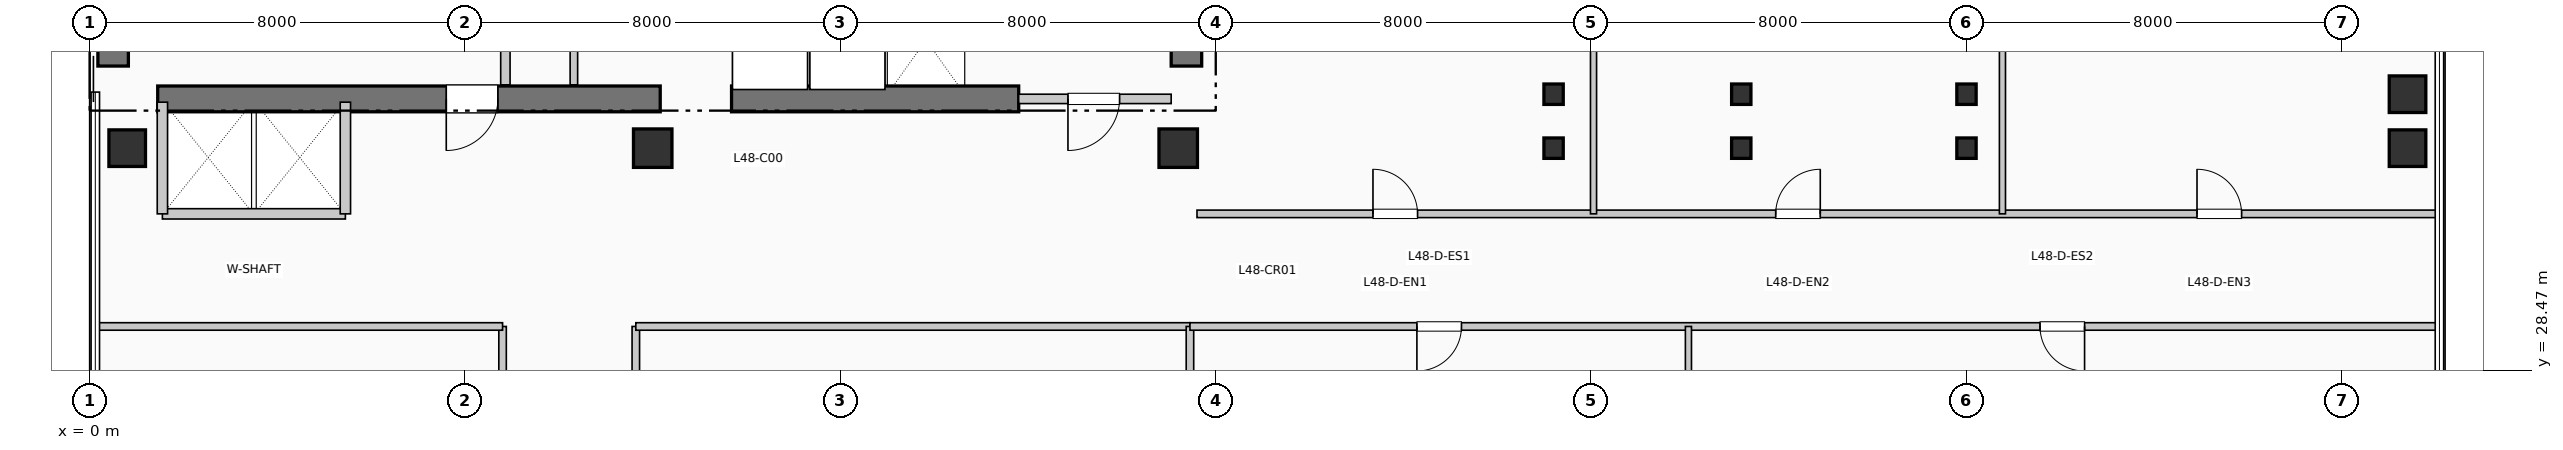
"""IFC4 building model, lengths in metres.
Left out: names, types, materials, properties, quantities, classifications, styles, units other than length and angle.
Written with IfcOpenShell. Run it as: python <this file> out.ifc"""

import sys

from ifc_helpers import new_model, si_unit, direction, frame, frame_2d, origin, origin_2d, place, context, subcontext, project, spatial, rectangle, i_section, extrude, element, fill, save


model = new_model("IFC4")
c1 = context("Model", 3, precision=1e-05, world=origin(), true_north=direction((0.0, 1.0)))
c2 = subcontext(c1, "Body", "Model", "MODEL_VIEW")
j1 = project(units=[si_unit("LENGTHUNIT", "METRE"), si_unit("PLANEANGLEUNIT", "RADIAN")], contexts=[c1])
p1 = place(None, origin())
s1 = spatial("IfcSite", under=j1, at=p1, CompositionType="ELEMENT")
p2 = place(p1, origin())
s2 = spatial("IfcBuilding", under=s1, at=p2, CompositionType="ELEMENT")
p3 = place(p2, frame((0.0, 0.0, 199.32)))
s3 = spatial("IfcBuildingStorey", under=s2, at=p3, CompositionType="ELEMENT", Elevation=199.32)
p4 = place(p3, frame((0.5, 34.95, 0.0), z_axis=(0.0, 0.0, 1.0), x_axis=(0.0, 1.0, 0.0)))
e1 = element("IfcWall", 1, at=p4, inside=s3, PredefinedType="SHEAR", context=c2, shape_type="SweptSolid", body=[
    extrude(rectangle(XDim=7.9, YDim=0.65, at=frame_2d((3.95, 0.0))), origin(), (0.0, 0.0, 1.0), 3.96),
])
p5 = place(p3, frame((23.375, 34.95, 0.0), z_axis=(0.0, 0.0, 1.0), x_axis=(0.0, 1.0, 0.0)))
e2 = element("IfcWall", 2, at=p5, inside=s3, PredefinedType="SHEAR", context=c2, shape_type="SweptSolid", body=[
    extrude(rectangle(XDim=10.64, YDim=0.65, at=frame_2d((5.32, 0.0))), origin(), (0.0, 0.0, 1.0), 3.96),
])
p6 = place(p3, frame((1.45, 34.25, 0.0), z_axis=(0.0, 0.0, 1.0), x_axis=(1.0, 0.0, 0.0)))
e3 = element("IfcWall", 3, at=p6, inside=s3, PredefinedType="SHEAR", context=c2, shape_type="SweptSolid", body=[
    extrude(rectangle(XDim=10.71, YDim=0.55, at=frame_2d((5.355, 0.0))), origin(), (0.0, 0.0, 1.0), 3.96),
])
p7 = place(p6, frame((7.25, 0.0, 0.0), z_axis=(0.0, 0.0, 1.0), x_axis=(-1.0, 0.0, 0.0)))
e4 = element("IfcOpeningElement", 4, at=p7, cuts=e3, PredefinedType="OPENING", context=c2, shape_type="SweptSolid", body=[
    extrude(rectangle(XDim=1.1, YDim=2.15, at=frame_2d((0.55, 1.075))), frame((0.0, 0.285, 0.0), z_axis=(0.0, -1.0, 0.0), x_axis=(1.0, 0.0, 0.0)), (0.0, 0.0, 1.0), 0.57),
])
p8 = place(p3, frame((13.68, 34.25, 0.0), z_axis=(0.0, 0.0, 1.0), x_axis=(1.0, 0.0, 0.0)))
e5 = element("IfcWall", 5, at=p8, inside=s3, PredefinedType="SHEAR", context=c2, shape_type="SweptSolid", body=[
    extrude(rectangle(XDim=6.12, YDim=0.55, at=frame_2d((3.06, 0.0))), origin(), (0.0, 0.0, 1.0), 3.96),
])
p9 = place(p3, frame((0.8, 33.2, 0.0), z_axis=(0.0, 0.0, 1.0), x_axis=(1.0, 0.0, 0.0)))
e6 = element("IfcColumn", 6, at=p9, inside=s3, PredefinedType="COLUMN", context=c2, shape_type="SweptSolid", body=[
    extrude(rectangle(XDim=0.78, YDim=0.78, at=origin_2d()), origin(), (0.0, 0.0, 1.0), 3.96),
])
for number, where, z_axis, x_axis in (
    (7, (12.0, 33.2, 0.0), (0.0, 0.0, 1.0), (1.0, 0.0, 0.0)),
    (8, (23.2, 33.2, 0.0), (0.0, 0.0, 1.0), (1.0, 0.0, 0.0)),
):
    element("IfcColumn", number, at=place(p3, frame(where, z_axis=z_axis, x_axis=x_axis)), inside=s3, PredefinedType="COLUMN", context=c2, shape_type="SweptSolid", body=[
        extrude(rectangle(XDim=0.82, YDim=0.82, at=origin_2d()), origin(), (0.0, 0.0, 1.0), 3.96),
    ])
for number, where, z_axis, x_axis in (
    (9, (31.2, 33.2, 0.0), (0.0, 0.0, 1.0), (1.0, 0.0, 0.0)),
    (10, (31.2, 34.35, 0.0), (0.0, 0.0, 1.0), (1.0, 0.0, 0.0)),
    (11, (35.2, 33.2, 0.0), (0.0, 0.0, 1.0), (1.0, 0.0, 0.0)),
    (12, (35.2, 34.35, 0.0), (0.0, 0.0, 1.0), (1.0, 0.0, 0.0)),
    (13, (40.0, 33.2, 0.0), (0.0, 0.0, 1.0), (1.0, 0.0, 0.0)),
    (14, (40.0, 34.35, 0.0), (0.0, 0.0, 1.0), (1.0, 0.0, 0.0)),
):
    element("IfcColumn", number, at=place(p3, frame(where, z_axis=z_axis, x_axis=x_axis)), inside=s3, PredefinedType="COLUMN", context=c2, shape_type="SweptSolid", body=[
        extrude(i_section(OverallWidth=0.412, OverallDepth=0.435, WebThickness=0.027, FlangeThickness=0.043, at=origin_2d()), origin(), (0.0, 0.0, 1.0), 3.96),
    ])
for number, where, z_axis, x_axis in (
    (15, (49.4, 33.2, 0.0), (0.0, 0.0, 1.0), (1.0, 0.0, 0.0)),
    (16, (49.4, 34.35, 0.0), (0.0, 0.0, 1.0), (1.0, 0.0, 0.0)),
):
    element("IfcColumn", number, at=place(p3, frame(where, z_axis=z_axis, x_axis=x_axis)), inside=s3, PredefinedType="COLUMN", context=c2, shape_type="SweptSolid", body=[
        extrude(rectangle(XDim=0.78, YDim=0.78, at=origin_2d()), origin(), (0.0, 0.0, 1.0), 3.96),
    ])
p10 = place(p3, frame((8.86, 34.55, 0.0), z_axis=(0.0, 0.0, 1.0), x_axis=(0.0, 1.0, 0.0)))
e17 = element("IfcWall", 17, at=p10, inside=s3, PredefinedType="PARTITIONING", context=c2, shape_type="SweptSolid", body=[
    extrude(rectangle(XDim=2.5, YDim=0.2, at=frame_2d((1.25, 0.0))), origin(), (0.0, 0.0, 1.0), 3.71),
])
p11 = place(p3, frame((19.8, 34.25, 0.0), z_axis=(0.0, 0.0, 1.0), x_axis=(1.0, 0.0, 0.0)))
e18 = element("IfcWall", 18, at=p11, inside=s3, PredefinedType="PARTITIONING", context=c2, shape_type="SweptSolid", body=[
    extrude(rectangle(XDim=3.25, YDim=0.2, at=frame_2d((1.625, 0.0))), origin(), (0.0, 0.0, 1.0), 3.71),
])
p12 = place(p11, frame((2.15, 0.0, 0.0), z_axis=(0.0, 0.0, 1.0), x_axis=(-1.0, 0.0, 0.0)))
e19 = element("IfcOpeningElement", 19, at=p12, cuts=e18, PredefinedType="OPENING", context=c2, shape_type="SweptSolid", body=[
    extrude(rectangle(XDim=1.1, YDim=2.15, at=frame_2d((0.55, 1.075))), frame((0.0, 0.11, 0.0), z_axis=(0.0, -1.0, 0.0), x_axis=(1.0, 0.0, 0.0)), (0.0, 0.0, 1.0), 0.22),
])
p13 = place(p3, frame((1.55, 31.8, 0.0), z_axis=(0.0, 0.0, 1.0), x_axis=(1.0, 0.0, 0.0)))
e20 = element("IfcWall", 20, at=p13, inside=s3, PredefinedType="PARTITIONING", context=c2, shape_type="SweptSolid", body=[
    extrude(rectangle(XDim=3.9, YDim=0.22, at=frame_2d((1.95, 0.0))), origin(), (0.0, 0.0, 1.0), 3.71),
])
for number, where, z_axis, x_axis in (
    (21, (1.55, 31.8, 0.0), (0.0, 0.0, 1.0), (0.0, 1.0, 0.0)),
    (22, (5.45, 31.8, 0.0), (0.0, 0.0, 1.0), (0.0, 1.0, 0.0)),
):
    element("IfcWall", number, at=place(p3, frame(where, z_axis=z_axis, x_axis=x_axis)), inside=s3, PredefinedType="PARTITIONING", context=c2, shape_type="SweptSolid", body=[
        extrude(rectangle(XDim=2.38, YDim=0.22, at=frame_2d((1.19, 0.0))), origin(), (0.0, 0.0, 1.0), 3.71),
    ])
p14 = place(p3, frame((10.32, 34.55, 0.0), z_axis=(0.0, 0.0, 1.0), x_axis=(0.0, 1.0, 0.0)))
e23 = element("IfcWall", 23, at=p14, inside=s3, PredefinedType="PARTITIONING", context=c2, shape_type="SweptSolid", body=[
    extrude(rectangle(XDim=2.15, YDim=0.16, at=frame_2d((1.075, 0.0))), origin(), (0.0, 0.0, 1.0), 3.71),
])
p15 = place(p3, frame((8.8, 13.2, 0.0), z_axis=(0.0, 0.0, 1.0), x_axis=(0.0, 1.0, 0.0)))
e24 = element("IfcWall", 24, at=p15, inside=s3, PredefinedType="PARTITIONING", context=c2, shape_type="SweptSolid", body=[
    extrude(rectangle(XDim=16.2, YDim=0.16, at=frame_2d((8.1, 0.0))), origin(), (0.0, 0.0, 1.0), 3.71),
])
p16 = place(p15, frame((2.581, 0.0, 0.0), z_axis=(0.0, 0.0, 1.0), x_axis=(-1.0, 0.0, 0.0)))
e25 = element("IfcOpeningElement", 25, at=p16, cuts=e24, PredefinedType="OPENING", context=c2, shape_type="SweptSolid", body=[
    extrude(rectangle(XDim=0.95, YDim=2.15, at=frame_2d((0.475, 1.075))), frame((0.0, 0.09, 0.0), z_axis=(0.0, -1.0, 0.0), x_axis=(1.0, 0.0, 0.0)), (0.0, 0.0, 1.0), 0.18),
])
p17 = place(p15, frame((7.117, 0.0, 0.0), z_axis=(0.0, 0.0, 1.0), x_axis=(-1.0, 0.0, 0.0)))
e26 = element("IfcOpeningElement", 26, at=p17, cuts=e24, PredefinedType="OPENING", context=c2, shape_type="SweptSolid", body=[
    extrude(rectangle(XDim=0.95, YDim=2.15, at=frame_2d((0.475, 1.075))), frame((0.0, 0.09, 0.0), z_axis=(0.0, -1.0, 0.0), x_axis=(1.0, 0.0, 0.0)), (0.0, 0.0, 1.0), 0.18),
])
p18 = place(p15, frame((13.111, 0.0, 0.0), z_axis=(0.0, 0.0, 1.0), x_axis=(-1.0, 0.0, 0.0)))
e27 = element("IfcOpeningElement", 27, at=p18, cuts=e24, PredefinedType="OPENING", context=c2, shape_type="SweptSolid", body=[
    extrude(rectangle(XDim=0.95, YDim=2.15, at=frame_2d((0.475, 1.075))), frame((0.0, 0.09, 0.0), z_axis=(0.0, -1.0, 0.0), x_axis=(1.0, 0.0, 0.0)), (0.0, 0.0, 1.0), 0.18),
])
p19 = place(p3, frame((11.64, 13.2, 0.0), z_axis=(0.0, 0.0, 1.0), x_axis=(0.0, 1.0, 0.0)))
e28 = element("IfcWall", 28, at=p19, inside=s3, PredefinedType="PARTITIONING", context=c2, shape_type="SweptSolid", body=[
    extrude(rectangle(XDim=16.2, YDim=0.16, at=frame_2d((8.1, 0.0))), origin(), (0.0, 0.0, 1.0), 3.095),
])
p20 = place(p19, frame((3.427, 0.0, 0.0)))
e29 = element("IfcOpeningElement", 29, at=p20, cuts=e28, PredefinedType="OPENING", context=c2, shape_type="SweptSolid", body=[
    extrude(rectangle(XDim=0.95, YDim=2.15, at=frame_2d((0.475, 1.075))), frame((0.0, 0.09, 0.0), z_axis=(0.0, -1.0, 0.0), x_axis=(1.0, 0.0, 0.0)), (0.0, 0.0, 1.0), 0.18),
])
p21 = place(p19, frame((11.027, 0.0, 0.0)))
e30 = element("IfcOpeningElement", 30, at=p21, cuts=e28, PredefinedType="OPENING", context=c2, shape_type="SweptSolid", body=[
    extrude(rectangle(XDim=0.95, YDim=2.15, at=frame_2d((0.475, 1.075))), frame((0.0, 0.09, 0.0), z_axis=(0.0, -1.0, 0.0), x_axis=(1.0, 0.0, 0.0)), (0.0, 0.0, 1.0), 0.18),
])
p22 = place(p3, frame((0.19, 29.4, 0.0), z_axis=(0.0, 0.0, 1.0), x_axis=(1.0, 0.0, 0.0)))
e31 = element("IfcWall", 31, at=p22, inside=s3, PredefinedType="PARTITIONING", context=c2, shape_type="SweptSolid", body=[
    extrude(rectangle(XDim=8.61, YDim=0.16, at=frame_2d((4.305, 0.0))), origin(), (0.0, 0.0, 1.0), 3.365),
])
p23 = place(p3, frame((11.64, 29.4, 0.0), z_axis=(0.0, 0.0, 1.0), x_axis=(1.0, 0.0, 0.0)))
e32 = element("IfcWall", 32, at=p23, inside=s3, PredefinedType="PARTITIONING", context=c2, shape_type="SweptSolid", body=[
    extrude(rectangle(XDim=11.81, YDim=0.16, at=frame_2d((5.905, 0.0))), origin(), (0.0, 0.0, 1.0), 3.365),
])
p24 = place(p3, frame((23.45, 6.84, 0.0), z_axis=(0.0, 0.0, 1.0), x_axis=(0.0, 1.0, 0.0)))
e33 = element("IfcWall", 33, at=p24, inside=s3, PredefinedType="PARTITIONING", context=c2, shape_type="SweptSolid", body=[
    extrude(rectangle(XDim=22.56, YDim=0.16, at=frame_2d((11.28, 0.0))), origin(), (0.0, 0.0, 1.0), 3.095),
])
p25 = place(p3, frame((23.45, 29.4, 0.0), z_axis=(0.0, 0.0, 1.0), x_axis=(1.0, 0.0, 0.0)))
e34 = element("IfcWall", 34, at=p25, inside=s3, PredefinedType="PARTITIONING", context=c2, shape_type="SweptSolid", body=[
    extrude(rectangle(XDim=26.56, YDim=0.16, at=frame_2d((13.28, 0.0))), origin(), (0.0, 0.0, 1.0), 3.365),
])
p26 = place(p25, frame((5.787, 0.0, 0.0), z_axis=(0.0, 0.0, 1.0), x_axis=(-1.0, 0.0, 0.0)))
e35 = element("IfcOpeningElement", 35, at=p26, cuts=e34, PredefinedType="OPENING", context=c2, shape_type="SweptSolid", body=[
    extrude(rectangle(XDim=0.95, YDim=2.15, at=frame_2d((0.475, 1.075))), frame((0.0, 0.09, 0.0), z_axis=(0.0, -1.0, 0.0), x_axis=(1.0, 0.0, 0.0)), (0.0, 0.0, 1.0), 0.18),
])
p27 = place(p25, frame((19.067, 0.0, 0.0), z_axis=(0.0, 0.0, 1.0), x_axis=(-1.0, 0.0, 0.0)))
e36 = element("IfcOpeningElement", 36, at=p27, cuts=e34, PredefinedType="OPENING", context=c2, shape_type="SweptSolid", body=[
    extrude(rectangle(XDim=0.95, YDim=2.15, at=frame_2d((0.475, 1.075))), frame((0.0, 0.09, 0.0), z_axis=(0.0, -1.0, 0.0), x_axis=(1.0, 0.0, 0.0)), (0.0, 0.0, 1.0), 0.18),
])
p28 = place(p3, frame((23.6, 31.8, 0.0), z_axis=(0.0, 0.0, 1.0), x_axis=(1.0, 0.0, 0.0)))
e37 = element("IfcWall", 37, at=p28, inside=s3, PredefinedType="PARTITIONING", context=c2, shape_type="SweptSolid", body=[
    extrude(rectangle(XDim=26.41, YDim=0.16, at=frame_2d((13.205, 0.0))), origin(), (0.0, 0.0, 1.0), 3.71),
])
p29 = place(p28, frame((3.75, 0.0, 0.0)))
e38 = element("IfcOpeningElement", 38, at=p29, cuts=e37, PredefinedType="OPENING", context=c2, shape_type="SweptSolid", body=[
    extrude(rectangle(XDim=0.95, YDim=2.15, at=frame_2d((0.475, 1.075))), frame((0.0, 0.09, 0.0), z_axis=(0.0, -1.0, 0.0), x_axis=(1.0, 0.0, 0.0)), (0.0, 0.0, 1.0), 0.18),
])
p30 = place(p28, frame((12.334, 0.0, 0.0)))
e39 = element("IfcOpeningElement", 39, at=p30, cuts=e37, PredefinedType="OPENING", context=c2, shape_type="SweptSolid", body=[
    extrude(rectangle(XDim=0.95, YDim=2.15, at=frame_2d((0.475, 1.075))), frame((0.0, 0.09, 0.0), z_axis=(0.0, -1.0, 0.0), x_axis=(1.0, 0.0, 0.0)), (0.0, 0.0, 1.0), 0.18),
])
p31 = place(p28, frame((21.313, 0.0, 0.0)))
e40 = element("IfcOpeningElement", 40, at=p31, cuts=e37, PredefinedType="OPENING", context=c2, shape_type="SweptSolid", body=[
    extrude(rectangle(XDim=0.95, YDim=2.15, at=frame_2d((0.475, 1.075))), frame((0.0, 0.09, 0.0), z_axis=(0.0, -1.0, 0.0), x_axis=(1.0, 0.0, 0.0)), (0.0, 0.0, 1.0), 0.18),
])
p32 = place(p3, frame((34.074, 22.19, 0.0), z_axis=(0.0, 0.0, 1.0), x_axis=(0.0, 1.0, 0.0)))
e41 = element("IfcWall", 41, at=p32, inside=s3, PredefinedType="PARTITIONING", context=c2, shape_type="SweptSolid", body=[
    extrude(rectangle(XDim=7.21, YDim=0.13, at=frame_2d((3.605, 0.0))), origin(), (0.0, 0.0, 1.0), 3.71),
])
for number, where, z_axis, x_axis in (
    (42, (32.051, 31.8, 0.0), (0.0, 0.0, 1.0), (0.0, 1.0, 0.0)),
    (43, (40.767, 31.8, 0.0), (0.0, 0.0, 1.0), (0.0, 1.0, 0.0)),
):
    element("IfcWall", number, at=place(p3, frame(where, z_axis=z_axis, x_axis=x_axis)), inside=s3, PredefinedType="PARTITIONING", context=c2, shape_type="SweptSolid", body=[
        extrude(rectangle(XDim=14.01, YDim=0.13, at=frame_2d((7.005, 0.0))), origin(), (0.0, 0.0, 1.0), 3.71),
    ])
p33 = place(p7, origin())
e44 = element("IfcDoor", 44, at=p33, inside=s3, OperationType="SINGLE_SWING_LEFT", PredefinedType="DOOR", context=c2, shape_type="SweptSolid", body=[
    extrude(rectangle(XDim=1.1, YDim=2.15, at=frame_2d((0.55, 1.075))), frame((0.0, 0.025, 0.0), z_axis=(0.0, -1.0, 0.0), x_axis=(1.0, 0.0, 0.0)), (0.0, 0.0, 1.0), 0.05),
])
fill(e4, e44)
p34 = place(p12, origin())
e45 = element("IfcDoor", 45, at=p34, inside=s3, OperationType="SINGLE_SWING_LEFT", PredefinedType="DOOR", context=c2, shape_type="SweptSolid", body=[
    extrude(rectangle(XDim=1.1, YDim=2.15, at=frame_2d((0.55, 1.075))), frame((0.0, 0.025, 0.0), z_axis=(0.0, -1.0, 0.0), x_axis=(1.0, 0.0, 0.0)), (0.0, 0.0, 1.0), 0.05),
])
fill(e19, e45)
p35 = place(p26, origin())
e46 = element("IfcDoor", 46, at=p35, inside=s3, OperationType="SINGLE_SWING_LEFT", PredefinedType="DOOR", context=c2, shape_type="SweptSolid", body=[
    extrude(rectangle(XDim=0.95, YDim=2.15, at=frame_2d((0.475, 1.075))), frame((0.0, 0.025, 0.0), z_axis=(0.0, -1.0, 0.0), x_axis=(1.0, 0.0, 0.0)), (0.0, 0.0, 1.0), 0.05),
])
fill(e35, e46)
p36 = place(p27, origin())
e47 = element("IfcDoor", 47, at=p36, inside=s3, OperationType="SINGLE_SWING_RIGHT", PredefinedType="DOOR", context=c2, shape_type="SweptSolid", body=[
    extrude(rectangle(XDim=0.95, YDim=2.15, at=frame_2d((0.475, 1.075))), frame((0.0, 0.025, 0.0), z_axis=(0.0, -1.0, 0.0), x_axis=(1.0, 0.0, 0.0)), (0.0, 0.0, 1.0), 0.05),
])
fill(e36, e47)
p37 = place(p29, origin())
e48 = element("IfcDoor", 48, at=p37, inside=s3, OperationType="SINGLE_SWING_LEFT", PredefinedType="DOOR", context=c2, shape_type="SweptSolid", body=[
    extrude(rectangle(XDim=0.95, YDim=2.15, at=frame_2d((0.475, 1.075))), frame((0.0, 0.025, 0.0), z_axis=(0.0, -1.0, 0.0), x_axis=(1.0, 0.0, 0.0)), (0.0, 0.0, 1.0), 0.05),
])
fill(e38, e48)
p38 = place(p30, origin())
e49 = element("IfcDoor", 49, at=p38, inside=s3, OperationType="SINGLE_SWING_RIGHT", PredefinedType="DOOR", context=c2, shape_type="SweptSolid", body=[
    extrude(rectangle(XDim=0.95, YDim=2.15, at=frame_2d((0.475, 1.075))), frame((0.0, 0.025, 0.0), z_axis=(0.0, -1.0, 0.0), x_axis=(1.0, 0.0, 0.0)), (0.0, 0.0, 1.0), 0.05),
])
fill(e39, e49)
p39 = place(p31, origin())
e50 = element("IfcDoor", 50, at=p39, inside=s3, OperationType="SINGLE_SWING_LEFT", PredefinedType="DOOR", context=c2, shape_type="SweptSolid", body=[
    extrude(rectangle(XDim=0.95, YDim=2.15, at=frame_2d((0.475, 1.075))), frame((0.0, 0.025, 0.0), z_axis=(0.0, -1.0, 0.0), x_axis=(1.0, 0.0, 0.0)), (0.0, 0.0, 1.0), 0.05),
])
fill(e40, e50)
save(model, sys.argv[1])
